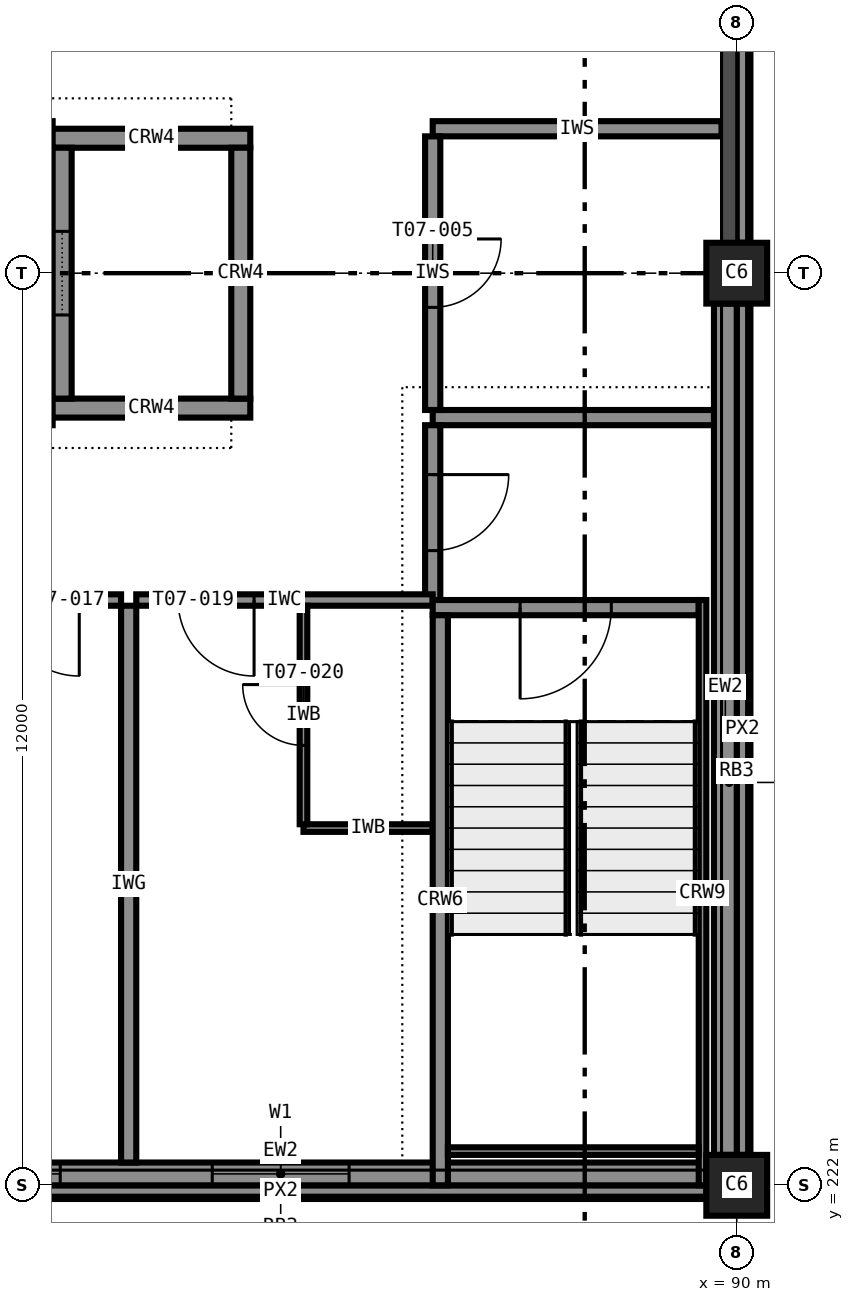
"""IFC4 building model, lengths in metres.
Left out: names, types, materials, properties, quantities, classifications, styles, units other than length and angle.
Written with IfcOpenShell. Run it as: python <this file> out.ifc"""

import sys

from ifc_helpers import new_model, si_unit, direction, frame, frame_2d, origin, origin_2d, place, context, subcontext, project, spatial, rectangle, extrude, element, fill, save


model = new_model("IFC4")
c1 = context("Model", 3, precision=1e-05, world=origin(), true_north=direction((0.0, 1.0)))
c2 = subcontext(c1, "Body", "Model", "MODEL_VIEW")
j1 = project(units=[si_unit("LENGTHUNIT", "METRE"), si_unit("PLANEANGLEUNIT", "RADIAN")], contexts=[c1])
p1 = place(None, origin())
s1 = spatial("IfcSite", under=j1, at=p1, CompositionType="ELEMENT")
p2 = place(p1, origin())
s2 = spatial("IfcBuilding", under=s1, at=p2, CompositionType="ELEMENT")
p3 = place(p2, frame((0.0, 0.0, 39.0)))
s3 = spatial("IfcBuildingStorey", under=s2, at=p3, CompositionType="ELEMENT", Elevation=39.0)
for number, where, z_axis, x_axis in (
    (1, (90.0, 222.0, 0.0), (0.0, 0.0, 1.0), (1.0, 0.0, 0.0)),
    (2, (90.0, 234.0, 0.0), (0.0, 0.0, 1.0), (1.0, 0.0, 0.0)),
):
    element("IfcColumn", number, at=place(p3, frame(where, z_axis=z_axis, x_axis=x_axis)), inside=s3, PredefinedType="COLUMN", context=c2, shape_type="SweptSolid", body=[
        extrude(rectangle(XDim=0.8, YDim=0.8, at=origin_2d()), origin(), (0.0, 0.0, 1.0), 3.6),
    ])
for number, where, z_axis, x_axis in (
    (3, (81.0, 232.225, 0.0), (0.0, 0.0, 1.0), (1.0, 0.0, 0.0)),
    (4, (81.0, 235.775, 0.0), (0.0, 0.0, 1.0), (1.0, 0.0, 0.0)),
):
    element("IfcWall", number, at=place(p3, frame(where, z_axis=z_axis, x_axis=x_axis)), inside=s3, PredefinedType="SHEAR", context=c2, shape_type="SweptSolid", body=[
        extrude(rectangle(XDim=2.6, YDim=0.25, at=frame_2d((1.3, 0.0))), origin(), (0.0, 0.0, 1.0), 3.6),
    ])
p4 = place(p3, frame((81.125, 232.35, 0.0), z_axis=(0.0, 0.0, 1.0), x_axis=(0.0, 1.0, 0.0)))
e5 = element("IfcWall", 5, at=p4, inside=s3, PredefinedType="SHEAR", context=c2, shape_type="SweptSolid", body=[
    extrude(rectangle(XDim=3.3, YDim=0.25, at=frame_2d((1.65, 0.0))), origin(), (0.0, 0.0, 1.0), 3.6),
])
p5 = place(p4, frame((1.1, 0.0, 0.0)))
e6 = element("IfcOpeningElement", 6, at=p5, cuts=e5, PredefinedType="OPENING", context=c2, shape_type="SweptSolid", body=[
    extrude(rectangle(XDim=1.1, YDim=2.1, at=frame_2d((0.55, 1.05))), frame((0.0, 0.135, 0.0), z_axis=(0.0, -1.0, 0.0), x_axis=(1.0, 0.0, 0.0)), (0.0, 0.0, 1.0), 0.27),
])
p6 = place(p3, frame((83.475, 232.35, 0.0), z_axis=(0.0, 0.0, 1.0), x_axis=(0.0, 1.0, 0.0)))
e7 = element("IfcWall", 7, at=p6, inside=s3, PredefinedType="SHEAR", context=c2, shape_type="SweptSolid", body=[
    extrude(rectangle(XDim=3.3, YDim=0.25, at=frame_2d((1.65, 0.0))), origin(), (0.0, 0.0, 1.0), 3.6),
])
p7 = place(p3, frame((89.5, 229.6, 0.0), z_axis=(0.0, 0.0, 1.0), x_axis=(-1.0, 0.0, 0.0)))
e8 = element("IfcWall", 8, at=p7, inside=s3, PredefinedType="SHEAR", context=c2, shape_type="SweptSolid", body=[
    extrude(rectangle(XDim=3.5, YDim=0.2, at=frame_2d((1.75, 0.0))), origin(), (0.0, 0.0, 1.0), 3.6),
])
p8 = place(p7, frame((1.15, 0.0, 0.0)))
e9 = element("IfcOpeningElement", 9, at=p8, cuts=e8, PredefinedType="OPENING", context=c2, shape_type="SweptSolid", body=[
    extrude(rectangle(XDim=1.2, YDim=2.1, at=frame_2d((0.6, 1.05))), frame((0.0, 0.11, 0.0), z_axis=(0.0, -1.0, 0.0), x_axis=(1.0, 0.0, 0.0)), (0.0, 0.0, 1.0), 0.22),
])
p9 = place(p3, frame((86.1, 222.0, 0.0), z_axis=(0.0, 0.0, 1.0), x_axis=(0.0, 1.0, 0.0)))
e10 = element("IfcWall", 10, at=p9, inside=s3, PredefinedType="SHEAR", context=c2, shape_type="SweptSolid", body=[
    extrude(rectangle(XDim=7.5, YDim=0.2, at=frame_2d((3.75, 0.0))), origin(), (0.0, 0.0, 1.0), 3.6),
])
p10 = place(p3, frame((89.55, 229.7, 0.0), z_axis=(0.0, 0.0, 1.0), x_axis=(0.0, -1.0, 0.0)))
e11 = element("IfcWall", 11, at=p10, inside=s3, PredefinedType="SHEAR", context=c2, shape_type="SweptSolid", body=[
    extrude(rectangle(XDim=7.7, YDim=0.1, at=frame_2d((3.85, 0.0))), origin(), (0.0, 0.0, 1.0), 3.4),
])
p11 = place(p3, frame((89.5, 222.45, 0.0), z_axis=(0.0, 0.0, 1.0), x_axis=(-1.0, 0.0, 0.0)))
e12 = element("IfcWall", 12, at=p11, inside=s3, PredefinedType="SHEAR", context=c2, shape_type="SweptSolid", body=[
    extrude(rectangle(XDim=3.3, YDim=0.1, at=frame_2d((1.65, 0.0))), origin(), (0.0, 0.0, 1.0), 3.4),
])
p12 = place(p3, frame((78.4, 222.15, 0.0), z_axis=(0.0, 0.0, 1.0), x_axis=(1.0, 0.0, 0.0)))
e13 = element("IfcWall", 13, at=p12, inside=s3, PredefinedType="STANDARD", context=c2, shape_type="SweptSolid", body=[
    extrude(rectangle(XDim=11.2, YDim=0.3, at=frame_2d((5.6, 0.0))), origin(), (0.0, 0.0, 1.0), 2.6),
])
p13 = place(p12, frame((0.9, 0.0, 0.85)))
e14 = element("IfcOpeningElement", 14, at=p13, cuts=e13, PredefinedType="OPENING", context=c2, shape_type="SweptSolid", body=[
    extrude(rectangle(XDim=1.8, YDim=1.75, at=frame_2d((0.9, 0.875))), frame((0.0, 0.16, 0.0), z_axis=(0.0, -1.0, 0.0), x_axis=(1.0, 0.0, 0.0)), (0.0, 0.0, 1.0), 0.32),
])
p14 = place(p12, frame((4.7, 0.0, 0.85)))
e15 = element("IfcOpeningElement", 15, at=p14, cuts=e13, PredefinedType="OPENING", context=c2, shape_type="SweptSolid", body=[
    extrude(rectangle(XDim=1.8, YDim=1.75, at=frame_2d((0.9, 0.875))), frame((0.0, 0.16, 0.0), z_axis=(0.0, -1.0, 0.0), x_axis=(1.0, 0.0, 0.0)), (0.0, 0.0, 1.0), 0.32),
])
p15 = place(p3, frame((78.4, 221.925, 3.4), z_axis=(0.0, 0.0, 1.0), x_axis=(1.0, 0.0, 0.0)))
e16 = element("IfcWall", 16, at=p15, inside=s3, PredefinedType="STANDARD", context=c2, shape_type="SweptSolid", body=[
    extrude(rectangle(XDim=11.2, YDim=0.15, at=frame_2d((5.6, 0.0))), origin(), (0.0, 0.0, 1.0), 0.2),
])
p16 = place(p3, frame((89.85, 222.4, 0.0), z_axis=(0.0, 0.0, 1.0), x_axis=(0.0, 1.0, 0.0)))
e17 = element("IfcWall", 17, at=p16, inside=s3, PredefinedType="STANDARD", context=c2, shape_type="SweptSolid", body=[
    extrude(rectangle(XDim=11.2, YDim=0.3, at=frame_2d((5.6, 0.0))), origin(), (0.0, 0.0, 1.0), 2.6),
])
for number, where, z_axis, x_axis in (
    (18, (90.075, 222.4, 3.4), (0.0, 0.0, 1.0), (0.0, 1.0, 0.0)),
    (19, (90.075, 234.4, 3.4), (0.0, 0.0, 1.0), (0.0, 1.0, 0.0)),
):
    element("IfcWall", number, at=place(p3, frame(where, z_axis=z_axis, x_axis=x_axis)), inside=s3, PredefinedType="STANDARD", context=c2, shape_type="SweptSolid", body=[
        extrude(rectangle(XDim=11.2, YDim=0.15, at=frame_2d((5.6, 0.0))), origin(), (0.0, 0.0, 1.0), 0.2),
    ])
p17 = place(p3, frame((86.0, 232.1, 0.0), z_axis=(0.0, 0.0, 1.0), x_axis=(1.0, 0.0, 0.0)))
e20 = element("IfcWall", 20, at=p17, inside=s3, PredefinedType="PARTITIONING", context=c2, shape_type="SweptSolid", body=[
    extrude(rectangle(XDim=3.7, YDim=0.2, at=frame_2d((1.85, 0.0))), origin(), (0.0, 0.0, 1.0), 3.4),
])
p18 = place(p3, frame((86.0, 235.9, 0.0), z_axis=(0.0, 0.0, 1.0), x_axis=(1.0, 0.0, 0.0)))
e21 = element("IfcWall", 21, at=p18, inside=s3, PredefinedType="PARTITIONING", context=c2, shape_type="SweptSolid", body=[
    extrude(rectangle(XDim=3.8, YDim=0.2, at=frame_2d((1.9, 0.0))), origin(), (0.0, 0.0, 1.0), 3.4),
])
p19 = place(p3, frame((86.0, 235.8, 0.0), z_axis=(0.0, 0.0, 1.0), x_axis=(0.0, -1.0, 0.0)))
e22 = element("IfcWall", 22, at=p19, inside=s3, PredefinedType="PARTITIONING", context=c2, shape_type="SweptSolid", body=[
    extrude(rectangle(XDim=3.6, YDim=0.2, at=frame_2d((1.8, 0.0))), origin(), (0.0, 0.0, 1.0), 3.4),
])
p20 = place(p19, frame((1.35, 0.0, 0.0)))
e23 = element("IfcOpeningElement", 23, at=p20, cuts=e22, PredefinedType="OPENING", context=c2, shape_type="SweptSolid", body=[
    extrude(rectangle(XDim=0.9, YDim=2.1, at=frame_2d((0.45, 1.05))), frame((0.0, 0.11, 0.0), z_axis=(0.0, -1.0, 0.0), x_axis=(1.0, 0.0, 0.0)), (0.0, 0.0, 1.0), 0.22),
])
p21 = place(p3, frame((86.0, 232.0, 0.0), z_axis=(0.0, 0.0, 1.0), x_axis=(0.0, -1.0, 0.0)))
e24 = element("IfcWall", 24, at=p21, inside=s3, PredefinedType="PARTITIONING", context=c2, shape_type="SweptSolid", body=[
    extrude(rectangle(XDim=2.3, YDim=0.2, at=frame_2d((1.15, 0.0))), origin(), (0.0, 0.0, 1.0), 3.4),
])
p22 = place(p21, frame((0.65, 0.0, 0.0)))
e25 = element("IfcOpeningElement", 25, at=p22, cuts=e24, PredefinedType="OPENING", context=c2, shape_type="SweptSolid", body=[
    extrude(rectangle(XDim=1.0, YDim=2.1, at=frame_2d((0.5, 1.05))), frame((0.0, 0.11, 0.0), z_axis=(0.0, -1.0, 0.0), x_axis=(1.0, 0.0, 0.0)), (0.0, 0.0, 1.0), 0.22),
])
p23 = place(p3, frame((81.9, 229.7, 0.0), z_axis=(0.0, 0.0, 1.0), x_axis=(-1.0, 0.0, 0.0)))
e26 = element("IfcWall", 26, at=p23, inside=s3, PredefinedType="PARTITIONING", context=c2, shape_type="SweptSolid", body=[
    extrude(rectangle(XDim=3.8, YDim=0.15, at=frame_2d((1.9, 0.0))), origin(), (0.0, 0.0, 1.0), 3.4),
])
p24 = place(p23, frame((0.55, 0.0, 0.0)))
e27 = element("IfcOpeningElement", 27, at=p24, cuts=e26, PredefinedType="OPENING", context=c2, shape_type="SweptSolid", body=[
    extrude(rectangle(XDim=1.0, YDim=2.1, at=frame_2d((0.5, 1.05))), frame((0.0, 0.085, 0.0), z_axis=(0.0, -1.0, 0.0), x_axis=(1.0, 0.0, 0.0)), (0.0, 0.0, 1.0), 0.17),
])
p25 = place(p3, frame((86.0, 229.7, 0.0), z_axis=(0.0, 0.0, 1.0), x_axis=(-1.0, 0.0, 0.0)))
e28 = element("IfcWall", 28, at=p25, inside=s3, PredefinedType="PARTITIONING", context=c2, shape_type="SweptSolid", body=[
    extrude(rectangle(XDim=3.9, YDim=0.15, at=frame_2d((1.95, 0.0))), origin(), (0.0, 0.0, 1.0), 3.4),
])
p26 = place(p25, frame((2.35, 0.0, 0.0)))
e29 = element("IfcOpeningElement", 29, at=p26, cuts=e28, PredefinedType="OPENING", context=c2, shape_type="SweptSolid", body=[
    extrude(rectangle(XDim=1.0, YDim=2.1, at=frame_2d((0.5, 1.05))), frame((0.0, 0.085, 0.0), z_axis=(0.0, -1.0, 0.0), x_axis=(1.0, 0.0, 0.0)), (0.0, 0.0, 1.0), 0.17),
])
p27 = place(p3, frame((84.3, 226.7, 0.0), z_axis=(0.0, 0.0, 1.0), x_axis=(1.0, 0.0, 0.0)))
e30 = element("IfcWall", 30, at=p27, inside=s3, PredefinedType="PARTITIONING", context=c2, shape_type="SweptSolid", body=[
    extrude(rectangle(XDim=1.7, YDim=0.1, at=frame_2d((0.85, 0.0))), origin(), (0.0, 0.0, 1.0), 3.4),
])
p28 = place(p3, frame((84.3, 226.75, 0.0), z_axis=(0.0, 0.0, 1.0), x_axis=(0.0, 1.0, 0.0)))
e31 = element("IfcWall", 31, at=p28, inside=s3, PredefinedType="PARTITIONING", context=c2, shape_type="SweptSolid", body=[
    extrude(rectangle(XDim=2.875, YDim=0.1, at=frame_2d((1.438, 0.0))), origin(), (0.0, 0.0, 1.0), 3.4),
])
p29 = place(p28, frame((1.038, 0.0, 0.0)))
e32 = element("IfcOpeningElement", 32, at=p29, cuts=e31, PredefinedType="OPENING", context=c2, shape_type="SweptSolid", body=[
    extrude(rectangle(XDim=0.8, YDim=2.1, at=frame_2d((0.4, 1.05))), frame((0.0, 0.06, 0.0), z_axis=(0.0, -1.0, 0.0), x_axis=(1.0, 0.0, 0.0)), (0.0, 0.0, 1.0), 0.12),
])
p30 = place(p3, frame((82.0, 222.3, 0.0), z_axis=(0.0, 0.0, 1.0), x_axis=(0.0, 1.0, 0.0)))
e33 = element("IfcWall", 33, at=p30, inside=s3, PredefinedType="PARTITIONING", context=c2, shape_type="SweptSolid", body=[
    extrude(rectangle(XDim=7.325, YDim=0.2, at=frame_2d((3.663, 0.0))), origin(), (0.0, 0.0, 1.0), 3.4),
])
p31 = place(p13, origin())
e34 = element("IfcWindow", 34, at=p31, inside=s3, PartitioningType="SINGLE_PANEL", PredefinedType="WINDOW", context=c2, shape_type="SweptSolid", body=[
    extrude(rectangle(XDim=1.8, YDim=1.75, at=frame_2d((0.9, 0.875))), frame((0.0, 0.03, 0.0), z_axis=(0.0, -1.0, 0.0), x_axis=(1.0, 0.0, 0.0)), (0.0, 0.0, 1.0), 0.06),
])
fill(e14, e34)
p32 = place(p14, origin())
e35 = element("IfcWindow", 35, at=p32, inside=s3, PartitioningType="SINGLE_PANEL", PredefinedType="WINDOW", context=c2, shape_type="SweptSolid", body=[
    extrude(rectangle(XDim=1.8, YDim=1.75, at=frame_2d((0.9, 0.875))), frame((0.0, 0.03, 0.0), z_axis=(0.0, -1.0, 0.0), x_axis=(1.0, 0.0, 0.0)), (0.0, 0.0, 1.0), 0.06),
])
fill(e15, e35)
p33 = place(p20, origin())
e36 = element("IfcDoor", 36, at=p33, inside=s3, OperationType="SINGLE_SWING_LEFT", PredefinedType="DOOR", context=c2, shape_type="SweptSolid", body=[
    extrude(rectangle(XDim=0.9, YDim=2.1, at=frame_2d((0.45, 1.05))), frame((0.0, 0.025, 0.0), z_axis=(0.0, -1.0, 0.0), x_axis=(1.0, 0.0, 0.0)), (0.0, 0.0, 1.0), 0.05),
])
fill(e23, e36)
p34 = place(p22, origin())
e37 = element("IfcDoor", 37, at=p34, inside=s3, OperationType="SINGLE_SWING_LEFT", PredefinedType="DOOR", context=c2, shape_type="SweptSolid", body=[
    extrude(rectangle(XDim=1.0, YDim=2.1, at=frame_2d((0.5, 1.05))), frame((0.0, 0.025, 0.0), z_axis=(0.0, -1.0, 0.0), x_axis=(1.0, 0.0, 0.0)), (0.0, 0.0, 1.0), 0.05),
])
fill(e25, e37)
p35 = place(p24, origin())
e38 = element("IfcDoor", 38, at=p35, inside=s3, OperationType="SINGLE_SWING_LEFT", PredefinedType="DOOR", context=c2, shape_type="SweptSolid", body=[
    extrude(rectangle(XDim=1.0, YDim=2.1, at=frame_2d((0.5, 1.05))), frame((0.0, 0.025, 0.0), z_axis=(0.0, -1.0, 0.0), x_axis=(1.0, 0.0, 0.0)), (0.0, 0.0, 1.0), 0.05),
])
fill(e27, e38)
p36 = place(p26, origin())
e39 = element("IfcDoor", 39, at=p36, inside=s3, OperationType="SINGLE_SWING_LEFT", PredefinedType="DOOR", context=c2, shape_type="SweptSolid", body=[
    extrude(rectangle(XDim=1.0, YDim=2.1, at=frame_2d((0.5, 1.05))), frame((0.0, 0.025, 0.0), z_axis=(0.0, -1.0, 0.0), x_axis=(1.0, 0.0, 0.0)), (0.0, 0.0, 1.0), 0.05),
])
fill(e29, e39)
p37 = place(p29, origin())
e40 = element("IfcDoor", 40, at=p37, inside=s3, OperationType="SINGLE_SWING_RIGHT", PredefinedType="DOOR", context=c2, shape_type="SweptSolid", body=[
    extrude(rectangle(XDim=0.8, YDim=2.1, at=frame_2d((0.4, 1.05))), frame((0.0, 0.025, 0.0), z_axis=(0.0, -1.0, 0.0), x_axis=(1.0, 0.0, 0.0)), (0.0, 0.0, 1.0), 0.05),
])
fill(e32, e40)
p38 = place(p5, origin())
e41 = element("IfcDoor", 41, at=p38, inside=s3, OperationType="SLIDING_TO_LEFT", PredefinedType="DOOR", context=c2, shape_type="SweptSolid", body=[
    extrude(rectangle(XDim=1.1, YDim=2.1, at=frame_2d((0.55, 1.05))), frame((0.0, 0.025, 0.0), z_axis=(0.0, -1.0, 0.0), x_axis=(1.0, 0.0, 0.0)), (0.0, 0.0, 1.0), 0.05),
])
fill(e6, e41)
p39 = place(p8, origin())
e42 = element("IfcDoor", 42, at=p39, inside=s3, OperationType="SINGLE_SWING_RIGHT", PredefinedType="DOOR", context=c2, shape_type="SweptSolid", body=[
    extrude(rectangle(XDim=1.2, YDim=2.1, at=frame_2d((0.6, 1.05))), frame((0.0, 0.025, 0.0), z_axis=(0.0, -1.0, 0.0), x_axis=(1.0, 0.0, 0.0)), (0.0, 0.0, 1.0), 0.05),
])
fill(e9, e42)
save(model, sys.argv[1])
